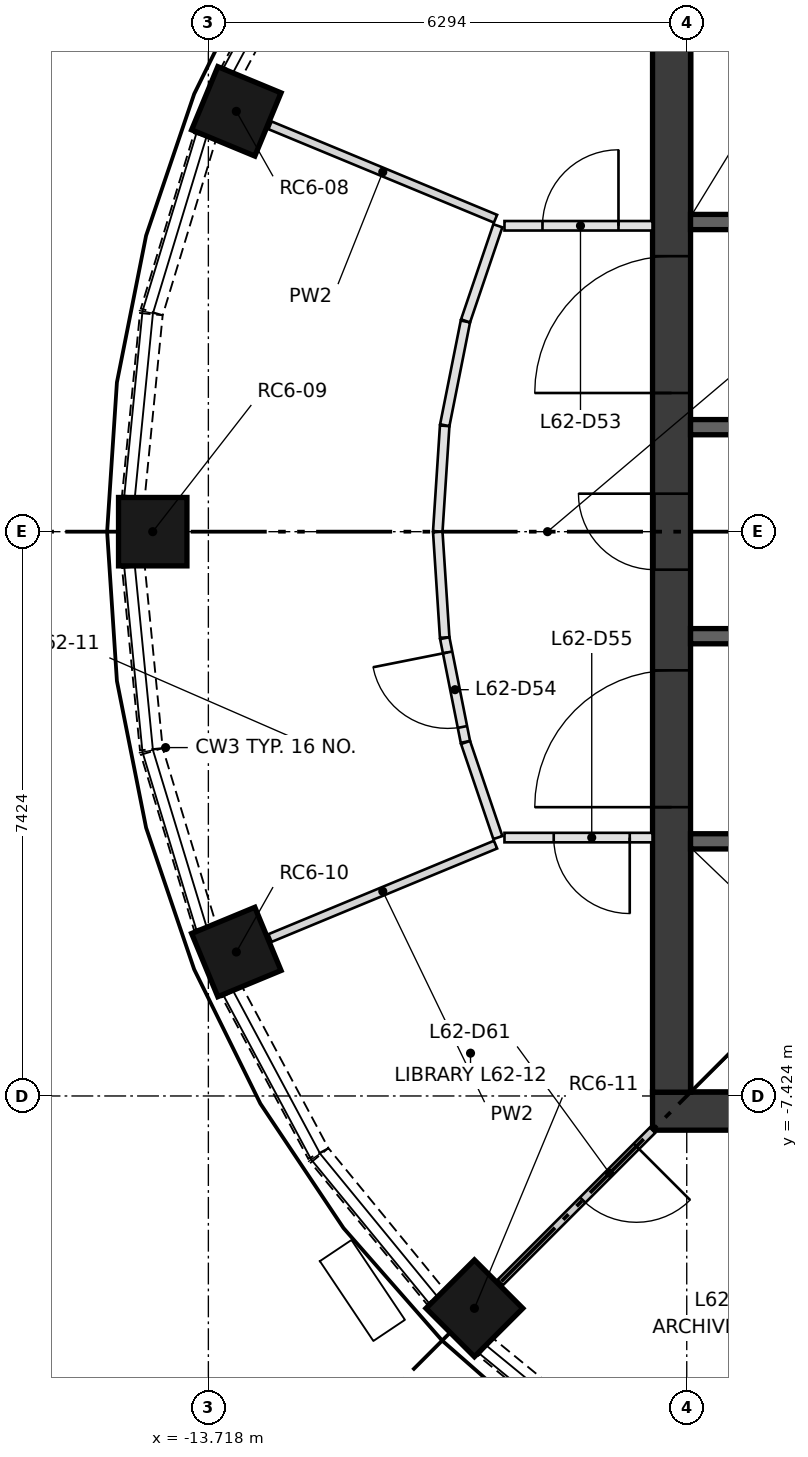
"""IFC4 building model, lengths in metres.
Left out: names, types, materials, properties, quantities, classifications, styles, units other than length and angle.
Written with IfcOpenShell. Run it as: python <this file> out.ifc"""

import sys

from ifc_helpers import new_model, si_unit, direction, frame, frame_2d, origin, origin_2d, place, context, subcontext, project, spatial, rectangle, extrude, element, fill, save


model = new_model("IFC4")
c1 = context("Model", 3, precision=1e-05, world=origin(), true_north=direction((0.0, 1.0)))
c2 = subcontext(c1, "Body", "Model", "MODEL_VIEW")
j1 = project(units=[si_unit("LENGTHUNIT", "METRE"), si_unit("PLANEANGLEUNIT", "RADIAN")], contexts=[c1])
p1 = place(None, origin())
s1 = spatial("IfcSite", under=j1, at=p1, CompositionType="ELEMENT")
p2 = place(p1, origin())
s2 = spatial("IfcBuilding", under=s1, at=p2, CompositionType="ELEMENT")
p3 = place(p2, frame((0.0, 0.0, 227.85)))
s3 = spatial("IfcBuildingStorey", under=s2, at=p3, CompositionType="ELEMENT", Elevation=227.85)
for number, where, z_axis, x_axis in (
    (1, (-13.35, 5.53, 0.5), (0.0, 0.0, 1.0), (-0.924, 0.383, 0.0)),
    (2, (-14.45, 0.0, 0.5), (0.0, 0.0, 1.0), (-1.0, 0.0, 0.0)),
    (3, (-13.35, -5.53, 0.5), (0.0, 0.0, 1.0), (-0.924, -0.383, 0.0)),
    (4, (-10.218, -10.218, 0.5), (0.0, 0.0, 1.0), (-0.707, -0.707, 0.0)),
):
    element("IfcColumn", number, at=place(p3, frame(where, z_axis=z_axis, x_axis=x_axis)), inside=s3, PredefinedType="COLUMN", context=c2, shape_type="SweptSolid", body=[
        extrude(rectangle(XDim=0.9, YDim=0.9, at=origin_2d()), origin(), (0.0, 0.0, 1.0), 2.35),
    ])
p4 = place(p3, frame((-7.874, -7.624, 0.0), z_axis=(0.0, 0.0, 1.0), x_axis=(1.0, 0.0, 0.0)))
e5 = element("IfcWall", 5, at=p4, inside=s3, PredefinedType="SHEAR", context=c2, shape_type="SweptSolid", body=[
    extrude(rectangle(XDim=15.748, YDim=0.5, at=frame_2d((7.874, 0.0))), origin(), (0.0, 0.0, 1.0), 3.35),
])
p5 = place(p3, frame((-7.624, -7.374, 0.0), z_axis=(0.0, 0.0, 1.0), x_axis=(0.0, 1.0, 0.0)))
e6 = element("IfcWall", 6, at=p5, inside=s3, PredefinedType="SHEAR", context=c2, shape_type="SweptSolid", body=[
    extrude(rectangle(XDim=14.748, YDim=0.5, at=frame_2d((7.374, 0.0))), origin(), (0.0, 0.0, 1.0), 3.35),
])
p6 = place(p5, frame((6.874, 0.0, 0.0)))
e7 = element("IfcOpeningElement", 7, at=p6, cuts=e6, PredefinedType="OPENING", context=c2, shape_type="SweptSolid", body=[
    extrude(rectangle(XDim=1.0, YDim=2.1, at=frame_2d((0.5, 1.05))), frame((0.0, 0.26, 0.0), z_axis=(0.0, -1.0, 0.0), x_axis=(1.0, 0.0, 0.0)), (0.0, 0.0, 1.0), 0.52),
])
p7 = place(p5, frame((3.75, 0.0, 0.0)))
e8 = element("IfcOpeningElement", 8, at=p7, cuts=e6, PredefinedType="OPENING", context=c2, shape_type="SweptSolid", body=[
    extrude(rectangle(XDim=1.8, YDim=2.1, at=frame_2d((0.9, 1.05))), frame((0.0, 0.26, 0.0), z_axis=(0.0, -1.0, 0.0), x_axis=(1.0, 0.0, 0.0)), (0.0, 0.0, 1.0), 0.52),
])
p8 = place(p5, frame((9.198, 0.0, 0.0)))
e9 = element("IfcOpeningElement", 9, at=p8, cuts=e6, PredefinedType="OPENING", context=c2, shape_type="SweptSolid", body=[
    extrude(rectangle(XDim=1.8, YDim=2.1, at=frame_2d((0.9, 1.05))), frame((0.0, 0.26, 0.0), z_axis=(0.0, -1.0, 0.0), x_axis=(1.0, 0.0, 0.0)), (0.0, 0.0, 1.0), 0.52),
])
p9 = place(p3, frame((-7.374, -4.074, 0.0), z_axis=(0.0, 0.0, 1.0), x_axis=(1.0, 0.0, 0.0)))
e10 = element("IfcWall", 10, at=p9, inside=s3, PredefinedType="SHEAR", context=c2, shape_type="SweptSolid", body=[
    extrude(rectangle(XDim=14.748, YDim=0.2, at=frame_2d((7.374, 0.0))), origin(), (0.0, 0.0, 1.0), 3.0),
])
p10 = place(p9, frame((1.319, 0.0, 0.0)))
e11 = element("IfcOpeningElement", 11, at=p10, cuts=e10, PredefinedType="OPENING", context=c2, shape_type="SweptSolid", body=[
    extrude(rectangle(XDim=1.1, YDim=2.1, at=frame_2d((0.55, 1.05))), frame((0.0, 0.11, 0.0), z_axis=(0.0, -1.0, 0.0), x_axis=(1.0, 0.0, 0.0)), (0.0, 0.0, 1.0), 0.22),
])
p11 = place(p9, frame((4.456, 0.0, 0.0)))
e12 = element("IfcOpeningElement", 12, at=p11, cuts=e10, PredefinedType="OPENING", context=c2, shape_type="SweptSolid", body=[
    extrude(rectangle(XDim=1.1, YDim=2.1, at=frame_2d((0.55, 1.05))), frame((0.0, 0.11, 0.0), z_axis=(0.0, -1.0, 0.0), x_axis=(1.0, 0.0, 0.0)), (0.0, 0.0, 1.0), 0.22),
])
p12 = place(p9, frame((7.159, 0.0, 0.0)))
e13 = element("IfcOpeningElement", 13, at=p12, cuts=e10, PredefinedType="OPENING", context=c2, shape_type="SweptSolid", body=[
    extrude(rectangle(XDim=0.8, YDim=2.1, at=frame_2d((0.4, 1.05))), frame((0.0, 0.11, 0.0), z_axis=(0.0, -1.0, 0.0), x_axis=(1.0, 0.0, 0.0)), (0.0, 0.0, 1.0), 0.22),
])
p13 = place(p9, frame((9.324, 0.0, 0.0)))
e14 = element("IfcOpeningElement", 14, at=p13, cuts=e10, PredefinedType="OPENING", context=c2, shape_type="SweptSolid", body=[
    extrude(rectangle(XDim=1.0, YDim=2.1, at=frame_2d((0.5, 1.05))), frame((0.0, 0.11, 0.0), z_axis=(0.0, -1.0, 0.0), x_axis=(1.0, 0.0, 0.0)), (0.0, 0.0, 1.0), 0.22),
])
p14 = place(p9, frame((11.393, 0.0, 0.0)))
e15 = element("IfcOpeningElement", 15, at=p14, cuts=e10, PredefinedType="OPENING", context=c2, shape_type="SweptSolid", body=[
    extrude(rectangle(XDim=1.0, YDim=2.1, at=frame_2d((0.5, 1.05))), frame((0.0, 0.11, 0.0), z_axis=(0.0, -1.0, 0.0), x_axis=(1.0, 0.0, 0.0)), (0.0, 0.0, 1.0), 0.22),
])
p15 = place(p9, frame((13.265, 0.0, 0.0)))
e16 = element("IfcOpeningElement", 16, at=p15, cuts=e10, PredefinedType="OPENING", context=c2, shape_type="SweptSolid", body=[
    extrude(rectangle(XDim=1.0, YDim=2.1, at=frame_2d((0.5, 1.05))), frame((0.0, 0.11, 0.0), z_axis=(0.0, -1.0, 0.0), x_axis=(1.0, 0.0, 0.0)), (0.0, 0.0, 1.0), 0.22),
])
p16 = place(p3, frame((-7.374, 4.074, 0.0), z_axis=(0.0, 0.0, 1.0), x_axis=(1.0, 0.0, 0.0)))
e17 = element("IfcWall", 17, at=p16, inside=s3, PredefinedType="SHEAR", context=c2, shape_type="SweptSolid", body=[
    extrude(rectangle(XDim=7.374, YDim=0.2, at=frame_2d((3.687, 0.0))), origin(), (0.0, 0.0, 1.0), 3.0),
])
p17 = place(p16, frame((0.684, 0.0, 0.0)))
e18 = element("IfcOpeningElement", 18, at=p17, cuts=e17, PredefinedType="OPENING", context=c2, shape_type="SweptSolid", body=[
    extrude(rectangle(XDim=1.0, YDim=2.1, at=frame_2d((0.5, 1.05))), frame((0.0, 0.11, 0.0), z_axis=(0.0, -1.0, 0.0), x_axis=(1.0, 0.0, 0.0)), (0.0, 0.0, 1.0), 0.22),
])
p18 = place(p16, frame((2.453, 0.0, 0.0)))
e19 = element("IfcOpeningElement", 19, at=p18, cuts=e17, PredefinedType="OPENING", context=c2, shape_type="SweptSolid", body=[
    extrude(rectangle(XDim=1.0, YDim=2.1, at=frame_2d((0.5, 1.05))), frame((0.0, 0.11, 0.0), z_axis=(0.0, -1.0, 0.0), x_axis=(1.0, 0.0, 0.0)), (0.0, 0.0, 1.0), 0.22),
])
p19 = place(p16, frame((4.221, 0.0, 0.0)))
e20 = element("IfcOpeningElement", 20, at=p19, cuts=e17, PredefinedType="OPENING", context=c2, shape_type="SweptSolid", body=[
    extrude(rectangle(XDim=1.0, YDim=2.1, at=frame_2d((0.5, 1.05))), frame((0.0, 0.11, 0.0), z_axis=(0.0, -1.0, 0.0), x_axis=(1.0, 0.0, 0.0)), (0.0, 0.0, 1.0), 0.22),
])
p20 = place(p16, frame((5.99, 0.0, 0.0)))
e21 = element("IfcOpeningElement", 21, at=p20, cuts=e17, PredefinedType="OPENING", context=c2, shape_type="SweptSolid", body=[
    extrude(rectangle(XDim=1.0, YDim=2.1, at=frame_2d((0.5, 1.05))), frame((0.0, 0.11, 0.0), z_axis=(0.0, -1.0, 0.0), x_axis=(1.0, 0.0, 0.0)), (0.0, 0.0, 1.0), 0.22),
])
for number, where, z_axis, x_axis in (
    (22, (-7.374, -1.375, 0.0), (0.0, 0.0, 1.0), (1.0, 0.0, 0.0)),
    (23, (-7.374, 1.375, 0.0), (0.0, 0.0, 1.0), (1.0, 0.0, 0.0)),
):
    element("IfcWall", number, at=place(p3, frame(where, z_axis=z_axis, x_axis=x_axis)), inside=s3, PredefinedType="SHEAR", context=c2, shape_type="SweptSolid", body=[
        extrude(rectangle(XDim=3.0, YDim=0.2, at=frame_2d((1.5, 0.0))), origin(), (0.0, 0.0, 1.0), 3.0),
    ])
p21 = place(p3, frame((-12.271, 8.181, 0.0), z_axis=(0.0, 0.0, 1.0), x_axis=(-0.471318859495, -0.881962886229, 0.0)))
e24 = element("IfcWall", 24, at=p21, inside=s3, PredefinedType="SOLIDWALL", context=c2, shape_type="SweptSolid", body=[
    extrude(rectangle(XDim=2.41, YDim=0.3, at=frame_2d((1.205, 0.0))), origin(), (0.0, 0.0, 1.0), 0.9),
])
p22 = place(p3, frame((-13.762, 5.198, 0.0), z_axis=(0.0, 0.0, 1.0), x_axis=(-0.290412066449, -0.956901683383, 0.0)))
e25 = element("IfcWall", 25, at=p22, inside=s3, PredefinedType="SOLIDWALL", context=c2, shape_type="SweptSolid", body=[
    extrude(rectangle(XDim=2.411, YDim=0.3, at=frame_2d((1.206, 0.0))), origin(), (0.0, 0.0, 1.0), 0.9),
])
for number, where, z_axis, x_axis in (
    (26, (-14.469, 2.862, 0.0), (0.0, 0.0, 1.0), (-0.098, -0.995, 0.0)),
    (27, (-14.705, -0.463, 0.0), (0.0, 0.0, 1.0), (0.098, -0.995, 0.0)),
):
    element("IfcWall", number, at=place(p3, frame(where, z_axis=z_axis, x_axis=x_axis)), inside=s3, PredefinedType="SOLIDWALL", context=c2, shape_type="SweptSolid", body=[
        extrude(rectangle(XDim=2.411, YDim=0.3, at=frame_2d((1.205, 0.0))), origin(), (0.0, 0.0, 1.0), 0.9),
    ])
p23 = place(p3, frame((-14.463, -2.891, 0.0), z_axis=(0.0, 0.0, 1.0), x_axis=(0.290412066449, -0.956901683383, 0.0)))
e28 = element("IfcWall", 28, at=p23, inside=s3, PredefinedType="SOLIDWALL", context=c2, shape_type="SweptSolid", body=[
    extrude(rectangle(XDim=2.411, YDim=0.3, at=frame_2d((1.206, 0.0))), origin(), (0.0, 0.0, 1.0), 0.9),
])
p24 = place(p3, frame((-13.407, -6.055, 0.0), z_axis=(0.0, 0.0, 1.0), x_axis=(0.471318859495, -0.881962886229, 0.0)))
e29 = element("IfcWall", 29, at=p24, inside=s3, PredefinedType="SOLIDWALL", context=c2, shape_type="SweptSolid", body=[
    extrude(rectangle(XDim=2.41, YDim=0.3, at=frame_2d((1.205, 0.0))), origin(), (0.0, 0.0, 1.0), 0.9),
])
for number, where, z_axis, x_axis in (
    (30, (-12.254, -8.206, 0.0), (0.0, 0.0, 1.0), (0.634, -0.773, 0.0)),
    (31, (-10.07, -10.726, 0.0), (0.0, 0.0, 1.0), (0.773, -0.634, 0.0)),
):
    element("IfcWall", number, at=place(p3, frame(where, z_axis=z_axis, x_axis=x_axis)), inside=s3, PredefinedType="SOLIDWALL", context=c2, shape_type="SweptSolid", body=[
        extrude(rectangle(XDim=2.411, YDim=0.3, at=frame_2d((1.206, 0.0))), origin(), (0.0, 0.0, 1.0), 0.9),
    ])
p25 = place(p3, frame((-9.822, 4.024, 0.0), z_axis=(0.0, 0.0, 1.0), x_axis=(1.0, 0.0, 0.0)))
e32 = element("IfcWall", 32, at=p25, inside=s3, PredefinedType="PARTITIONING", context=c2, shape_type="SweptSolid", body=[
    extrude(rectangle(XDim=1.948, YDim=0.125, at=frame_2d((0.974, 0.0))), origin(), (0.0, 0.0, 1.0), 3.0),
])
p26 = place(p25, frame((0.5, 0.0, 0.0)))
e33 = element("IfcOpeningElement", 33, at=p26, cuts=e32, PredefinedType="OPENING", context=c2, shape_type="SweptSolid", body=[
    extrude(rectangle(XDim=1.0, YDim=2.1, at=frame_2d((0.5, 1.05))), frame((0.0, 0.073, 0.0), z_axis=(0.0, -1.0, 0.0), x_axis=(1.0, 0.0, 0.0)), (0.0, 0.0, 1.0), 0.145),
])
for number, where, z_axis, x_axis in (
    (34, (-10.7, 0.004, 0.0), (0.0, 0.0, 1.0), (0.065, 0.998, 0.0)),
    (35, (-10.609, -1.393, 0.0), (0.0, 0.0, 1.0), (-0.065, 0.998, 0.0)),
):
    element("IfcWall", number, at=place(p3, frame(where, z_axis=z_axis, x_axis=x_axis)), inside=s3, PredefinedType="PARTITIONING", context=c2, shape_type="SweptSolid", body=[
        extrude(rectangle(XDim=1.391, YDim=0.125, at=frame_2d((0.696, 0.0))), origin(), (0.0, 0.0, 1.0), 3.0),
    ])
p27 = place(p3, frame((-10.608, 1.401, 0.0), z_axis=(0.0, 0.0, 1.0), x_axis=(0.195103801462, 0.980782599078, 0.0)))
e36 = element("IfcWall", 36, at=p27, inside=s3, PredefinedType="PARTITIONING", context=c2, shape_type="SweptSolid", body=[
    extrude(rectangle(XDim=1.392, YDim=0.125, at=frame_2d((0.696, 0.0))), origin(), (0.0, 0.0, 1.0), 3.0),
])
p28 = place(p3, frame((-10.336, -2.765, 0.0), z_axis=(0.0, 0.0, 1.0), x_axis=(-0.195103801462, 0.980782599078, 0.0)))
e37 = element("IfcWall", 37, at=p28, inside=s3, PredefinedType="PARTITIONING", context=c2, shape_type="SweptSolid", body=[
    extrude(rectangle(XDim=1.392, YDim=0.125, at=frame_2d((0.696, 0.0))), origin(), (0.0, 0.0, 1.0), 3.0),
])
p29 = place(p28, frame((0.2, 0.0, 0.0)))
e38 = element("IfcOpeningElement", 38, at=p29, cuts=e37, PredefinedType="OPENING", context=c2, shape_type="SweptSolid", body=[
    extrude(rectangle(XDim=1.0, YDim=2.1, at=frame_2d((0.5, 1.05))), frame((0.0, 0.073, 0.0), z_axis=(0.0, -1.0, 0.0), x_axis=(1.0, 0.0, 0.0)), (0.0, 0.0, 1.0), 0.145),
])
for number, where, z_axis, x_axis in (
    (39, (-10.334, 2.773, 0.0), (0.0, 0.0, 1.0), (0.321, 0.947, 0.0)),
    (40, (-9.909, -4.024, 0.0), (0.0, 0.0, 1.0), (-0.321, 0.947, 0.0)),
):
    element("IfcWall", number, at=place(p3, frame(where, z_axis=z_axis, x_axis=x_axis)), inside=s3, PredefinedType="PARTITIONING", context=c2, shape_type="SweptSolid", body=[
        extrude(rectangle(XDim=1.321, YDim=0.125, at=frame_2d((0.661, 0.0))), origin(), (0.0, 0.0, 1.0), 3.0),
    ])
p30 = place(p3, frame((-7.874, -4.024, 0.0), z_axis=(0.0, 0.0, 1.0), x_axis=(-1.0, 0.0, 0.0)))
e41 = element("IfcWall", 41, at=p30, inside=s3, PredefinedType="PARTITIONING", context=c2, shape_type="SweptSolid", body=[
    extrude(rectangle(XDim=1.948, YDim=0.125, at=frame_2d((0.974, 0.0))), origin(), (0.0, 0.0, 1.0), 3.0),
])
p31 = place(p30, frame((0.3, 0.0, 0.0)))
e42 = element("IfcOpeningElement", 42, at=p31, cuts=e41, PredefinedType="OPENING", context=c2, shape_type="SweptSolid", body=[
    extrude(rectangle(XDim=1.0, YDim=2.1, at=frame_2d((0.5, 1.05))), frame((0.0, 0.073, 0.0), z_axis=(0.0, -1.0, 0.0), x_axis=(1.0, 0.0, 0.0)), (0.0, 0.0, 1.0), 0.145),
])
for number, where, z_axis, x_axis in (
    (43, (-9.94, 4.117, 0.0), (0.0, 0.0, 1.0), (-0.924, 0.383, 0.0)),
    (44, (-9.94, -4.117, 0.0), (0.0, 0.0, 1.0), (-0.924, -0.383, 0.0)),
):
    element("IfcWall", number, at=place(p3, frame(where, z_axis=z_axis, x_axis=x_axis)), inside=s3, PredefinedType="PARTITIONING", context=c2, shape_type="SweptSolid", body=[
        extrude(rectangle(XDim=3.211, YDim=0.11, at=frame_2d((1.605, 0.0))), origin(), (0.0, 0.0, 1.0), 3.0),
    ])
p32 = place(p3, frame((-7.874, -7.874, 0.0), z_axis=(0.0, 0.0, 1.0), x_axis=(-0.707106781187, -0.707106781187, 0.0)))
e45 = element("IfcWall", 45, at=p32, inside=s3, PredefinedType="PARTITIONING", context=c2, shape_type="SweptSolid", body=[
    extrude(rectangle(XDim=2.835, YDim=0.1, at=frame_2d((1.417, 0.0))), origin(), (0.0, 0.0, 1.0), 3.0),
])
p33 = place(p32, frame((0.3, 0.0, 0.0)))
e46 = element("IfcOpeningElement", 46, at=p33, cuts=e45, PredefinedType="OPENING", context=c2, shape_type="SweptSolid", body=[
    extrude(rectangle(XDim=1.0, YDim=2.1, at=frame_2d((0.5, 1.05))), frame((0.0, 0.06, 0.0), z_axis=(0.0, -1.0, 0.0), x_axis=(1.0, 0.0, 0.0)), (0.0, 0.0, 1.0), 0.12),
])
p34 = place(p6, origin())
e47 = element("IfcDoor", 47, at=p34, inside=s3, OperationType="SINGLE_SWING_RIGHT", PredefinedType="DOOR", context=c2, shape_type="SweptSolid", body=[
    extrude(rectangle(XDim=1.0, YDim=2.1, at=frame_2d((0.5, 1.05))), frame((0.0, 0.25, 0.0), z_axis=(0.0, -1.0, 0.0), x_axis=(1.0, 0.0, 0.0)), (0.0, 0.0, 1.0), 0.05),
])
fill(e7, e47)
p35 = place(p7, origin())
e48 = element("IfcDoor", 48, at=p35, inside=s3, OperationType="DOUBLE_DOOR_SINGLE_SWING", PredefinedType="DOOR", context=c2, shape_type="SweptSolid", body=[
    extrude(rectangle(XDim=1.8, YDim=2.1, at=frame_2d((0.9, 1.05))), frame((0.0, 0.025, 0.0), z_axis=(0.0, -1.0, 0.0), x_axis=(1.0, 0.0, 0.0)), (0.0, 0.0, 1.0), 0.05),
])
fill(e8, e48)
p36 = place(p8, origin())
e49 = element("IfcDoor", 49, at=p36, inside=s3, OperationType="DOUBLE_DOOR_SINGLE_SWING", PredefinedType="DOOR", context=c2, shape_type="SweptSolid", body=[
    extrude(rectangle(XDim=1.8, YDim=2.1, at=frame_2d((0.9, 1.05))), frame((0.0, 0.025, 0.0), z_axis=(0.0, -1.0, 0.0), x_axis=(1.0, 0.0, 0.0)), (0.0, 0.0, 1.0), 0.05),
])
fill(e9, e49)
p37 = place(p26, origin())
e50 = element("IfcDoor", 50, at=p37, inside=s3, OperationType="SINGLE_SWING_RIGHT", PredefinedType="DOOR", context=c2, shape_type="SweptSolid", body=[
    extrude(rectangle(XDim=1.0, YDim=2.1, at=frame_2d((0.5, 1.05))), frame((0.0, 0.025, 0.0), z_axis=(0.0, -1.0, 0.0), x_axis=(1.0, 0.0, 0.0)), (0.0, 0.0, 1.0), 0.05),
])
fill(e33, e50)
p38 = place(p29, origin())
e51 = element("IfcDoor", 51, at=p38, inside=s3, OperationType="SINGLE_SWING_RIGHT", PredefinedType="DOOR", context=c2, shape_type="SweptSolid", body=[
    extrude(rectangle(XDim=1.0, YDim=2.1, at=frame_2d((0.5, 1.05))), frame((0.0, 0.025, 0.0), z_axis=(0.0, -1.0, 0.0), x_axis=(1.0, 0.0, 0.0)), (0.0, 0.0, 1.0), 0.05),
])
fill(e38, e51)
p39 = place(p31, origin())
e52 = element("IfcDoor", 52, at=p39, inside=s3, OperationType="SINGLE_SWING_LEFT", PredefinedType="DOOR", context=c2, shape_type="SweptSolid", body=[
    extrude(rectangle(XDim=1.0, YDim=2.1, at=frame_2d((0.5, 1.05))), frame((0.0, 0.025, 0.0), z_axis=(0.0, -1.0, 0.0), x_axis=(1.0, 0.0, 0.0)), (0.0, 0.0, 1.0), 0.05),
])
fill(e42, e52)
p40 = place(p33, origin())
e53 = element("IfcDoor", 53, at=p40, inside=s3, OperationType="SINGLE_SWING_LEFT", PredefinedType="DOOR", context=c2, shape_type="SweptSolid", body=[
    extrude(rectangle(XDim=1.0, YDim=2.1, at=frame_2d((0.5, 1.05))), frame((0.0, 0.025, 0.0), z_axis=(0.0, -1.0, 0.0), x_axis=(1.0, 0.0, 0.0)), (0.0, 0.0, 1.0), 0.05),
])
fill(e46, e53)
save(model, sys.argv[1])
